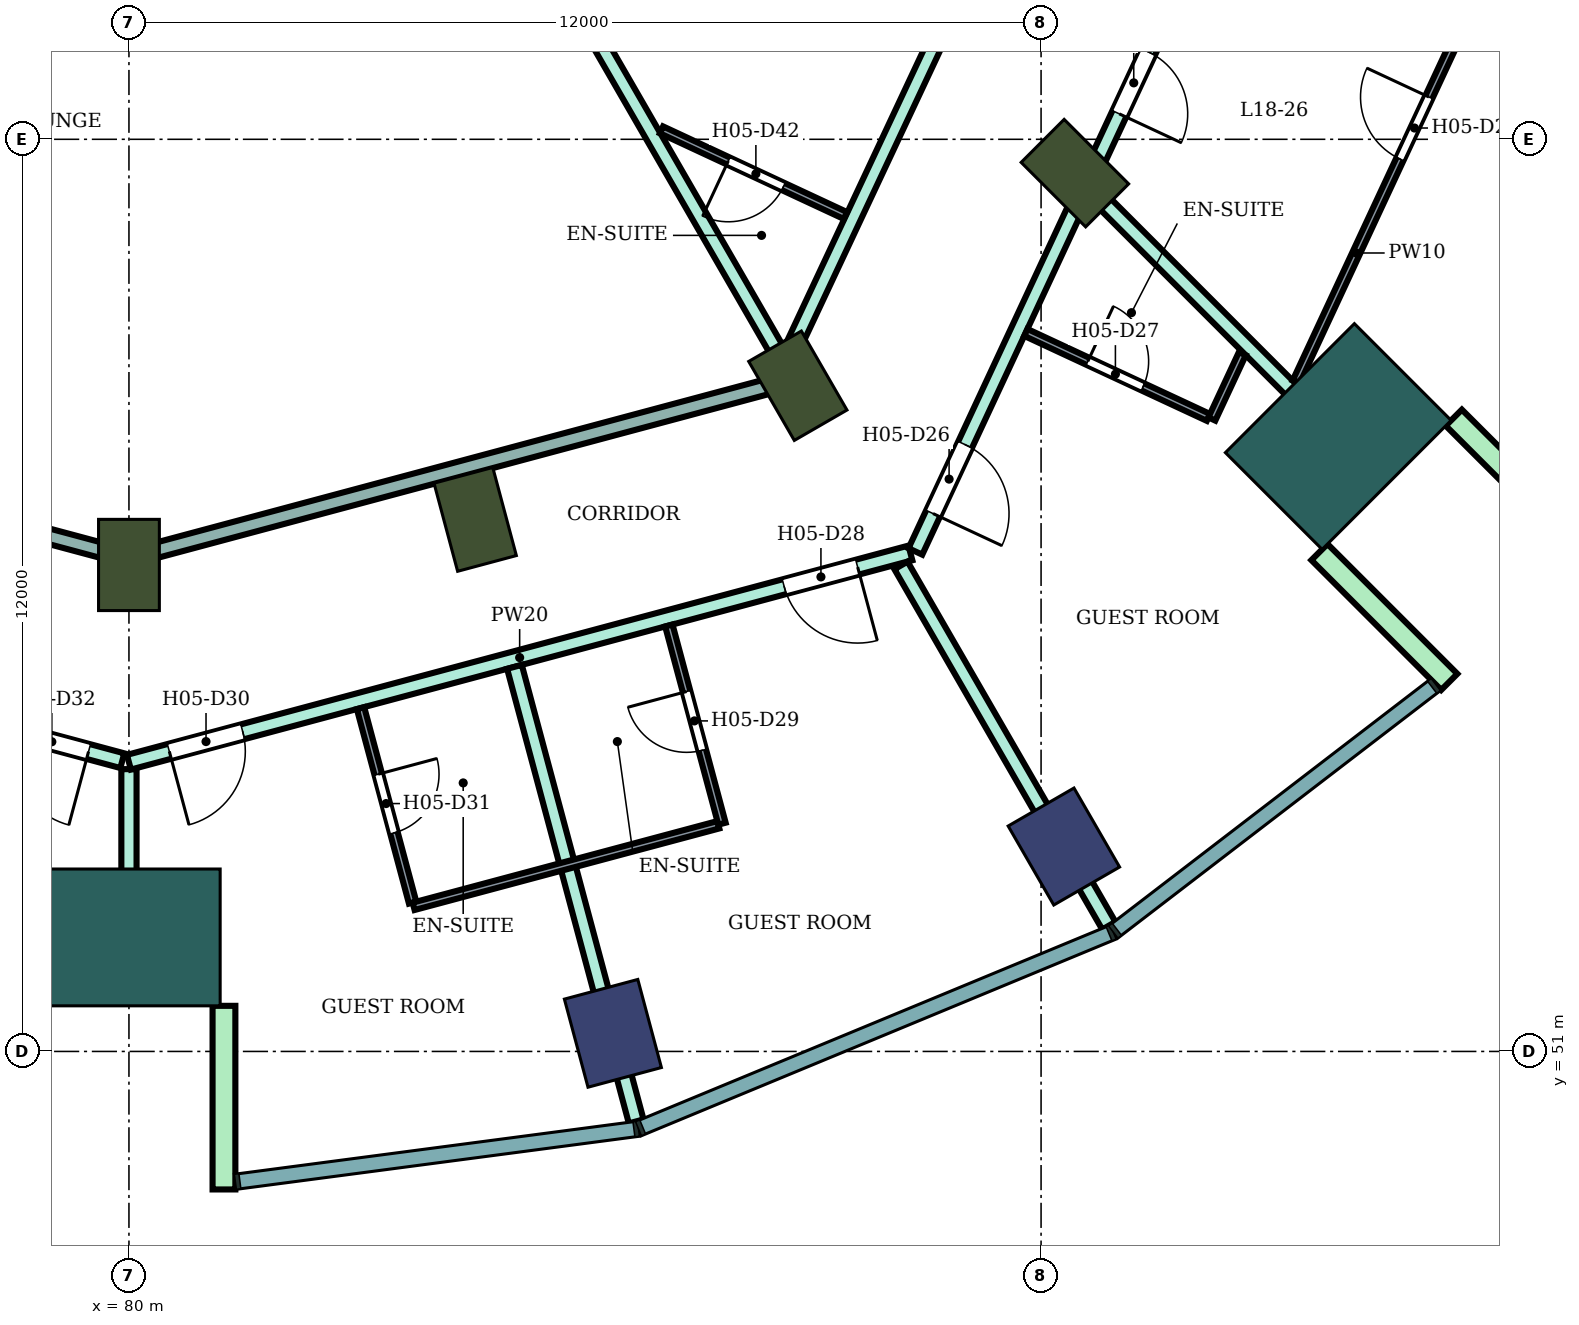
"""IFC4 building model, lengths in metres.
Left out: names, types, materials, properties, quantities, classifications, styles, units other than length and angle.
Written with IfcOpenShell. Run it as: python <this file> out.ifc"""

import sys

from ifc_helpers import new_model, si_unit, direction, frame, frame_2d, origin, origin_2d, place, context, subcontext, project, spatial, rectangle, extrude, element, fill, save


model = new_model("IFC4")
c1 = context("Model", 3, precision=1e-05, world=origin(), true_north=direction((0.0, 1.0)))
c2 = subcontext(c1, "Body", "Model", "MODEL_VIEW")
j1 = project(units=[si_unit("LENGTHUNIT", "METRE"), si_unit("PLANEANGLEUNIT", "RADIAN")], contexts=[c1])
p1 = place(None, origin())
s1 = spatial("IfcSite", under=j1, at=p1, CompositionType="ELEMENT")
p2 = place(p1, origin())
s2 = spatial("IfcBuilding", under=s1, at=p2, CompositionType="ELEMENT")
p3 = place(p2, frame((0.0, 0.0, 82.4)))
s3 = spatial("IfcBuildingStorey", under=s2, at=p3, CompositionType="ELEMENT", Elevation=82.4)
for number, where, z_axis, x_axis in (
    (1, (86.367, 51.238, 0.0), (0.0, 0.0, 1.0), (0.259, -0.966, 0.0)),
    (2, (92.3, 53.696, 0.0), (0.0, 0.0, 1.0), (0.5, -0.866, 0.0)),
):
    element("IfcColumn", number, at=place(p3, frame(where, z_axis=z_axis, x_axis=x_axis)), inside=s3, PredefinedType="COLUMN", context=c2, shape_type="SweptSolid", body=[
        extrude(rectangle(XDim=1.2, YDim=1.0, at=origin_2d()), origin(), (0.0, 0.0, 1.0), 3.8),
    ])
for number, where, z_axis, x_axis in (
    (3, (80.0, 57.4, 0.0), (0.0, 0.0, 1.0), (0.0, -1.0, 0.0)),
    (4, (84.555, 58.0, 0.0), (0.0, 0.0, 1.0), (0.259, -0.966, 0.0)),
    (5, (88.8, 59.758, 0.0), (0.0, 0.0, 1.0), (0.5, -0.866, 0.0)),
    (6, (92.445, 62.555, 0.0), (0.0, 0.0, 1.0), (0.707, -0.707, 0.0)),
):
    element("IfcColumn", number, at=place(p3, frame(where, z_axis=z_axis, x_axis=x_axis)), inside=s3, PredefinedType="COLUMN", context=c2, shape_type="SweptSolid", body=[
        extrude(rectangle(XDim=1.2, YDim=0.8, at=origin_2d()), origin(), (0.0, 0.0, 1.0), 3.8),
    ])
for number, where, z_axis, x_axis in (
    (7, (80.0, 52.5, 0.0), (0.0, 0.0, 1.0), (0.0, -1.0, 0.0)),
    (8, (95.91, 59.09, 0.0), (0.0, 0.0, 1.0), (0.707, -0.707, 0.0)),
):
    element("IfcColumn", number, at=place(p3, frame(where, z_axis=z_axis, x_axis=x_axis)), inside=s3, PredefinedType="COLUMN", context=c2, shape_type="SweptSolid", body=[
        extrude(rectangle(XDim=1.8, YDim=2.4, at=origin_2d()), origin(), (0.0, 0.0, 1.0), 3.8),
    ])
for number, where, z_axis, x_axis in (
    (9, (81.25, 51.6, 0.0), (0.0, 0.0, 1.0), (0.0, -1.0, 0.0)),
    (10, (95.662, 57.57, 0.0), (0.0, 0.0, 1.0), (0.707, -0.707, 0.0)),
    (11, (97.43, 59.338, 0.0), (0.0, 0.0, 1.0), (0.707, -0.707, 0.0)),
):
    element("IfcWall", number, at=place(p3, frame(where, z_axis=z_axis, x_axis=x_axis)), inside=s3, PredefinedType="NOTDEFINED", context=c2, shape_type="SweptSolid", body=[
        extrude(rectangle(XDim=2.416, YDim=0.3, at=frame_2d((1.208, 0.0))), origin(), (0.0, 0.0, 1.0), 3.8),
    ])
p4 = place(p3, frame((69.652, 57.578, 0.0), z_axis=(0.0, 0.0, 1.0), x_axis=(0.965857425723, -0.259074184695, 0.0)))
e12 = element("IfcWall", 12, at=p4, inside=s3, PredefinedType="PARTITIONING", context=c2, shape_type="SweptSolid", body=[
    extrude(rectangle(XDim=10.623, YDim=0.2, at=frame_2d((5.312, 0.0))), origin(), (0.0, 0.0, 1.0), 3.35),
])
p5 = place(p4, frame((9.163, 0.0, 0.0)))
e13 = element("IfcOpeningElement", 13, at=p5, cuts=e12, PredefinedType="OPENING", context=c2, shape_type="SweptSolid", body=[
    extrude(rectangle(XDim=1.0, YDim=2.1, at=frame_2d((0.5, 1.05))), frame((0.0, 0.11, 0.0), z_axis=(0.0, -1.0, 0.0), x_axis=(1.0, 0.0, 0.0)), (0.0, 0.0, 1.0), 0.22),
])
p6 = place(p4, frame((0.788, 0.0, 0.0)))
e14 = element("IfcOpeningElement", 14, at=p6, cuts=e12, PredefinedType="OPENING", context=c2, shape_type="SweptSolid", body=[
    extrude(rectangle(XDim=1.0, YDim=2.1, at=frame_2d((0.5, 1.05))), frame((0.0, 0.11, 0.0), z_axis=(0.0, -1.0, 0.0), x_axis=(1.0, 0.0, 0.0)), (0.0, 0.0, 1.0), 0.22),
])
p7 = place(p3, frame((71.498, 59.774, 0.0), z_axis=(0.0, 0.0, 1.0), x_axis=(0.965911938046, -0.258870871168, 0.0)))
e15 = element("IfcWall", 15, at=p7, inside=s3, PredefinedType="PARTITIONING", context=c2, shape_type="SweptSolid", body=[
    extrude(rectangle(XDim=8.752, YDim=0.2, at=frame_2d((4.376, 0.0))), origin(), (0.0, 0.0, 1.0), 2.98),
])
p8 = place(p7, frame((4.701, 0.0, 0.0)))
e16 = element("IfcOpeningElement", 16, at=p8, cuts=e15, PredefinedType="OPENING", context=c2, shape_type="SweptSolid", body=[
    extrude(rectangle(XDim=1.8, YDim=2.1, at=frame_2d((0.9, 1.05))), frame((0.0, 0.11, 0.0), z_axis=(0.0, -1.0, 0.0), x_axis=(1.0, 0.0, 0.0)), (0.0, 0.0, 1.0), 0.22),
])
p9 = place(p3, frame((80.0, 51.8, 0.0), z_axis=(0.0, 0.0, 1.0), x_axis=(0.0, 1.0, 0.0)))
e17 = element("IfcWall", 17, at=p9, inside=s3, PredefinedType="PARTITIONING", context=c2, shape_type="SweptSolid", body=[
    extrude(rectangle(XDim=2.914, YDim=0.2, at=frame_2d((1.457, 0.0))), origin(), (0.0, 0.0, 1.0), 3.35),
])
p10 = place(p3, frame((80.0, 54.805, 0.0), z_axis=(0.0, 0.0, 1.0), x_axis=(0.965962177934, 0.258683340788, 0.0)))
e18 = element("IfcWall", 18, at=p10, inside=s3, PredefinedType="PARTITIONING", context=c2, shape_type="SweptSolid", body=[
    extrude(rectangle(XDim=10.643, YDim=0.2, at=frame_2d((5.322, 0.0))), origin(), (0.0, 0.0, 1.0), 3.35),
])
p11 = place(p10, frame((8.925, 0.0, 0.0)))
e19 = element("IfcOpeningElement", 19, at=p11, cuts=e18, PredefinedType="OPENING", context=c2, shape_type="SweptSolid", body=[
    extrude(rectangle(XDim=1.0, YDim=2.1, at=frame_2d((0.5, 1.05))), frame((0.0, 0.11, 0.0), z_axis=(0.0, -1.0, 0.0), x_axis=(1.0, 0.0, 0.0)), (0.0, 0.0, 1.0), 0.22),
])
p12 = place(p10, frame((0.55, 0.0, 0.0)))
e20 = element("IfcOpeningElement", 20, at=p12, cuts=e18, PredefinedType="OPENING", context=c2, shape_type="SweptSolid", body=[
    extrude(rectangle(XDim=1.0, YDim=2.1, at=frame_2d((0.5, 1.05))), frame((0.0, 0.11, 0.0), z_axis=(0.0, -1.0, 0.0), x_axis=(1.0, 0.0, 0.0)), (0.0, 0.0, 1.0), 0.22),
])
p13 = place(p3, frame((80.0, 57.496, 0.0), z_axis=(0.0, 0.0, 1.0), x_axis=(0.96592471314, 0.258823199396, 0.0)))
e21 = element("IfcWall", 21, at=p13, inside=s3, PredefinedType="PARTITIONING", context=c2, shape_type="SweptSolid", body=[
    extrude(rectangle(XDim=8.732, YDim=0.2, at=frame_2d((4.366, 0.0))), origin(), (0.0, 0.0, 1.0), 2.98),
])
p14 = place(p3, frame((83.846, 68.33, 0.0), z_axis=(0.0, 0.0, 1.0), x_axis=(0.499822319857, -0.866127963163, 0.0)))
e22 = element("IfcWall", 22, at=p14, inside=s3, PredefinedType="PARTITIONING", context=c2, shape_type="SweptSolid", body=[
    extrude(rectangle(XDim=9.382, YDim=0.2, at=frame_2d((4.691, 0.0))), origin(), (0.0, 0.0, 1.0), 3.35),
])
p15 = place(p3, frame((85.072, 56.06, 0.0), z_axis=(0.0, 0.0, 1.0), x_axis=(0.258703231129, -0.965956851109, 0.0)))
e23 = element("IfcWall", 23, at=p15, inside=s3, PredefinedType="PARTITIONING", context=c2, shape_type="SweptSolid", body=[
    extrude(rectangle(XDim=6.191, YDim=0.2, at=frame_2d((3.095, 0.0))), origin(), (0.0, 0.0, 1.0), 3.35),
])
p16 = place(p3, frame((88.501, 59.775, 0.0), z_axis=(0.0, 0.0, 1.0), x_axis=(0.424700525505, 0.905333896215, 0.0)))
e24 = element("IfcWall", 24, at=p16, inside=s3, PredefinedType="PARTITIONING", context=c2, shape_type="SweptSolid", body=[
    extrude(rectangle(XDim=7.53, YDim=0.2, at=frame_2d((3.765, 0.0))), origin(), (0.0, 0.0, 1.0), 3.35),
])
p17 = place(p16, frame((5.83, 0.0, 0.0)))
e25 = element("IfcOpeningElement", 25, at=p17, cuts=e24, PredefinedType="OPENING", context=c2, shape_type="SweptSolid", body=[
    extrude(rectangle(XDim=1.0, YDim=2.1, at=frame_2d((0.5, 1.05))), frame((0.0, 0.11, 0.0), z_axis=(0.0, -1.0, 0.0), x_axis=(1.0, 0.0, 0.0)), (0.0, 0.0, 1.0), 0.22),
])
p18 = place(p3, frame((90.157, 57.394, 0.0), z_axis=(0.0, 0.0, 1.0), x_axis=(0.499815153866, -0.86613209845, 0.0)))
e26 = element("IfcWall", 26, at=p18, inside=s3, PredefinedType="PARTITIONING", context=c2, shape_type="SweptSolid", body=[
    extrude(rectangle(XDim=5.472, YDim=0.2, at=frame_2d((2.736, 0.0))), origin(), (0.0, 0.0, 1.0), 3.35),
])
p19 = place(p3, frame((90.346, 57.578, 0.0), z_axis=(0.0, 0.0, 1.0), x_axis=(0.422403412327, 0.906407941964, 0.0)))
e27 = element("IfcWall", 27, at=p19, inside=s3, PredefinedType="PARTITIONING", context=c2, shape_type="SweptSolid", body=[
    extrude(rectangle(XDim=8.208, YDim=0.2, at=frame_2d((4.104, 0.0))), origin(), (0.0, 0.0, 1.0), 3.35),
])
p20 = place(p19, frame((6.351, 0.0, 0.0)))
e28 = element("IfcOpeningElement", 28, at=p20, cuts=e27, PredefinedType="OPENING", context=c2, shape_type="SweptSolid", body=[
    extrude(rectangle(XDim=0.9, YDim=2.1, at=frame_2d((0.45, 1.05))), frame((0.0, 0.11, 0.0), z_axis=(0.0, -1.0, 0.0), x_axis=(1.0, 0.0, 0.0)), (0.0, 0.0, 1.0), 0.22),
])
p21 = place(p19, frame((0.55, 0.0, 0.0)))
e29 = element("IfcOpeningElement", 29, at=p21, cuts=e27, PredefinedType="OPENING", context=c2, shape_type="SweptSolid", body=[
    extrude(rectangle(XDim=1.0, YDim=2.1, at=frame_2d((0.5, 1.05))), frame((0.0, 0.11, 0.0), z_axis=(0.0, -1.0, 0.0), x_axis=(1.0, 0.0, 0.0)), (0.0, 0.0, 1.0), 0.22),
])
p22 = place(p3, frame((92.692, 62.303, 0.0), z_axis=(0.0, 0.0, 1.0), x_axis=(0.706920663731, -0.707292849667, 0.0)))
e30 = element("IfcWall", 30, at=p22, inside=s3, PredefinedType="PARTITIONING", context=c2, shape_type="SweptSolid", body=[
    extrude(rectangle(XDim=5.248, YDim=0.2, at=frame_2d((2.624, 0.0))), origin(), (0.0, 0.0, 1.0), 3.35),
])
p23 = place(p3, frame((83.047, 55.516, 0.0), z_axis=(0.0, 0.0, 1.0), x_axis=(0.258677737588, -0.965963678446, 0.0)))
e31 = element("IfcWall", 31, at=p23, inside=s3, PredefinedType="PARTITIONING", context=c2, shape_type="SweptSolid", body=[
    extrude(rectangle(XDim=2.649, YDim=0.1, at=frame_2d((1.325, 0.0))), origin(), (0.0, 0.0, 1.0), 3.35),
])
p24 = place(p23, frame((0.9, 0.0, 0.0)))
e32 = element("IfcOpeningElement", 32, at=p24, cuts=e31, PredefinedType="OPENING", context=c2, shape_type="SweptSolid", body=[
    extrude(rectangle(XDim=0.8, YDim=2.1, at=frame_2d((0.4, 1.05))), frame((0.0, 0.06, 0.0), z_axis=(0.0, -1.0, 0.0), x_axis=(1.0, 0.0, 0.0)), (0.0, 0.0, 1.0), 0.12),
])
p25 = place(p3, frame((83.745, 52.909, 0.0), z_axis=(0.0, 0.0, 1.0), x_axis=(0.965995295758, 0.258559642196, 0.0)))
e33 = element("IfcWall", 33, at=p25, inside=s3, PredefinedType="PARTITIONING", context=c2, shape_type="SweptSolid", body=[
    extrude(rectangle(XDim=4.15, YDim=0.1, at=frame_2d((2.075, 0.0))), origin(), (0.0, 0.0, 1.0), 3.35),
])
p26 = place(p3, frame((87.006, 63.124, 0.0), z_axis=(0.0, 0.0, 1.0), x_axis=(0.906535604863, -0.422129360642, 0.0)))
e34 = element("IfcWall", 34, at=p26, inside=s3, PredefinedType="PARTITIONING", context=c2, shape_type="SweptSolid", body=[
    extrude(rectangle(XDim=2.67, YDim=0.1, at=frame_2d((1.335, 0.0))), origin(), (0.0, 0.0, 1.0), 3.35),
])
p27 = place(p26, frame((0.97, 0.0, 0.0)))
e35 = element("IfcOpeningElement", 35, at=p27, cuts=e34, PredefinedType="OPENING", context=c2, shape_type="SweptSolid", body=[
    extrude(rectangle(XDim=0.8, YDim=2.1, at=frame_2d((0.4, 1.05))), frame((0.0, 0.06, 0.0), z_axis=(0.0, -1.0, 0.0), x_axis=(1.0, 0.0, 0.0)), (0.0, 0.0, 1.0), 0.12),
])
p28 = place(p3, frame((87.103, 56.604, 0.0), z_axis=(0.0, 0.0, 1.0), x_axis=(0.258883730688, -0.965908491517, 0.0)))
e36 = element("IfcWall", 36, at=p28, inside=s3, PredefinedType="PARTITIONING", context=c2, shape_type="SweptSolid", body=[
    extrude(rectangle(XDim=2.7, YDim=0.1, at=frame_2d((1.35, 0.0))), origin(), (0.0, 0.0, 1.0), 3.35),
])
p29 = place(p28, frame((0.9, 0.0, 0.0)))
e37 = element("IfcOpeningElement", 37, at=p29, cuts=e36, PredefinedType="OPENING", context=c2, shape_type="SweptSolid", body=[
    extrude(rectangle(XDim=0.8, YDim=2.1, at=frame_2d((0.4, 1.05))), frame((0.0, 0.06, 0.0), z_axis=(0.0, -1.0, 0.0), x_axis=(1.0, 0.0, 0.0)), (0.0, 0.0, 1.0), 0.12),
])
p30 = place(p3, frame((91.8, 60.459, 0.0), z_axis=(0.0, 0.0, 1.0), x_axis=(0.906644059932, -0.421896371861, 0.0)))
e38 = element("IfcWall", 38, at=p30, inside=s3, PredefinedType="PARTITIONING", context=c2, shape_type="SweptSolid", body=[
    extrude(rectangle(XDim=2.649, YDim=0.1, at=frame_2d((1.325, 0.0))), origin(), (0.0, 0.0, 1.0), 3.35),
])
p31 = place(p30, frame((0.899, 0.0, 0.0)))
e39 = element("IfcOpeningElement", 39, at=p31, cuts=e38, PredefinedType="OPENING", context=c2, shape_type="SweptSolid", body=[
    extrude(rectangle(XDim=0.8, YDim=2.1, at=frame_2d((0.4, 1.05))), frame((0.0, 0.06, 0.0), z_axis=(0.0, -1.0, 0.0), x_axis=(1.0, 0.0, 0.0)), (0.0, 0.0, 1.0), 0.12),
])
p32 = place(p3, frame((94.247, 59.32, 0.0), z_axis=(0.0, 0.0, 1.0), x_axis=(0.422660124657, 0.906288264861, 0.0)))
e40 = element("IfcWall", 40, at=p32, inside=s3, PredefinedType="PARTITIONING", context=c2, shape_type="SweptSolid", body=[
    extrude(rectangle(XDim=0.949, YDim=0.1, at=frame_2d((0.475, 0.0))), origin(), (0.0, 0.0, 1.0), 3.35),
])
p33 = place(p3, frame((95.355, 59.806, 0.0), z_axis=(0.0, 0.0, 1.0), x_axis=(0.422407546544, 0.906406015328, 0.0)))
e41 = element("IfcWall", 41, at=p33, inside=s3, PredefinedType="PARTITIONING", context=c2, shape_type="SweptSolid", body=[
    extrude(rectangle(XDim=7.496, YDim=0.1, at=frame_2d((3.748, 0.0))), origin(), (0.0, 0.0, 1.0), 3.35),
])
p34 = place(p33, frame((3.238, 0.0, 0.0)))
e42 = element("IfcOpeningElement", 42, at=p34, cuts=e41, PredefinedType="OPENING", context=c2, shape_type="SweptSolid", body=[
    extrude(rectangle(XDim=0.9, YDim=2.1, at=frame_2d((0.45, 1.05))), frame((0.0, 0.06, 0.0), z_axis=(0.0, -1.0, 0.0), x_axis=(1.0, 0.0, 0.0)), (0.0, 0.0, 1.0), 0.12),
])
p35 = place(p20, frame((0.9, 0.0, 0.0), z_axis=(0.0, 0.0, 1.0), x_axis=(-1.0, 0.0, 0.0)))
e43 = element("IfcDoor", 43, at=p35, inside=s3, OperationType="SINGLE_SWING_RIGHT", PredefinedType="DOOR", context=c2, shape_type="SweptSolid", body=[
    extrude(rectangle(XDim=0.9, YDim=2.1, at=frame_2d((0.45, 1.05))), frame((0.0, 0.025, 0.0), z_axis=(0.0, -1.0, 0.0), x_axis=(1.0, 0.0, 0.0)), (0.0, 0.0, 1.0), 0.05),
])
fill(e28, e43)
p36 = place(p34, origin())
e44 = element("IfcDoor", 44, at=p36, inside=s3, OperationType="SINGLE_SWING_RIGHT", PredefinedType="DOOR", context=c2, shape_type="SweptSolid", body=[
    extrude(rectangle(XDim=0.9, YDim=2.1, at=frame_2d((0.45, 1.05))), frame((0.0, 0.025, 0.0), z_axis=(0.0, -1.0, 0.0), x_axis=(1.0, 0.0, 0.0)), (0.0, 0.0, 1.0), 0.05),
])
fill(e42, e44)
p37 = place(p21, frame((1.0, 0.0, 0.0), z_axis=(0.0, 0.0, 1.0), x_axis=(-1.0, 0.0, 0.0)))
e45 = element("IfcDoor", 45, at=p37, inside=s3, OperationType="SINGLE_SWING_RIGHT", PredefinedType="DOOR", context=c2, shape_type="SweptSolid", body=[
    extrude(rectangle(XDim=1.0, YDim=2.1, at=frame_2d((0.5, 1.05))), frame((0.0, 0.025, 0.0), z_axis=(0.0, -1.0, 0.0), x_axis=(1.0, 0.0, 0.0)), (0.0, 0.0, 1.0), 0.05),
])
fill(e29, e45)
p38 = place(p31, origin())
e46 = element("IfcDoor", 46, at=p38, inside=s3, OperationType="SINGLE_SWING_LEFT", PredefinedType="DOOR", context=c2, shape_type="SweptSolid", body=[
    extrude(rectangle(XDim=0.8, YDim=2.1, at=frame_2d((0.4, 1.05))), frame((0.0, 0.025, 0.0), z_axis=(0.0, -1.0, 0.0), x_axis=(1.0, 0.0, 0.0)), (0.0, 0.0, 1.0), 0.05),
])
fill(e39, e46)
p39 = place(p11, frame((1.0, 0.0, 0.0), z_axis=(0.0, 0.0, 1.0), x_axis=(-1.0, 0.0, 0.0)))
e47 = element("IfcDoor", 47, at=p39, inside=s3, OperationType="SINGLE_SWING_LEFT", PredefinedType="DOOR", context=c2, shape_type="SweptSolid", body=[
    extrude(rectangle(XDim=1.0, YDim=2.1, at=frame_2d((0.5, 1.05))), frame((0.0, 0.025, 0.0), z_axis=(0.0, -1.0, 0.0), x_axis=(1.0, 0.0, 0.0)), (0.0, 0.0, 1.0), 0.05),
])
fill(e19, e47)
p40 = place(p29, frame((0.8, 0.0, 0.0), z_axis=(0.0, 0.0, 1.0), x_axis=(-1.0, 0.0, 0.0)))
e48 = element("IfcDoor", 48, at=p40, inside=s3, OperationType="SINGLE_SWING_RIGHT", PredefinedType="DOOR", context=c2, shape_type="SweptSolid", body=[
    extrude(rectangle(XDim=0.8, YDim=2.1, at=frame_2d((0.4, 1.05))), frame((0.0, 0.025, 0.0), z_axis=(0.0, -1.0, 0.0), x_axis=(1.0, 0.0, 0.0)), (0.0, 0.0, 1.0), 0.05),
])
fill(e37, e48)
p41 = place(p12, frame((1.0, 0.0, 0.0), z_axis=(0.0, 0.0, 1.0), x_axis=(-1.0, 0.0, 0.0)))
e49 = element("IfcDoor", 49, at=p41, inside=s3, OperationType="SINGLE_SWING_RIGHT", PredefinedType="DOOR", context=c2, shape_type="SweptSolid", body=[
    extrude(rectangle(XDim=1.0, YDim=2.1, at=frame_2d((0.5, 1.05))), frame((0.0, 0.025, 0.0), z_axis=(0.0, -1.0, 0.0), x_axis=(1.0, 0.0, 0.0)), (0.0, 0.0, 1.0), 0.05),
])
fill(e20, e49)
p42 = place(p24, origin())
e50 = element("IfcDoor", 50, at=p42, inside=s3, OperationType="SINGLE_SWING_LEFT", PredefinedType="DOOR", context=c2, shape_type="SweptSolid", body=[
    extrude(rectangle(XDim=0.8, YDim=2.1, at=frame_2d((0.4, 1.05))), frame((0.0, 0.025, 0.0), z_axis=(0.0, -1.0, 0.0), x_axis=(1.0, 0.0, 0.0)), (0.0, 0.0, 1.0), 0.05),
])
fill(e32, e50)
p43 = place(p5, frame((1.0, 0.0, 0.0), z_axis=(0.0, 0.0, 1.0), x_axis=(-1.0, 0.0, 0.0)))
e51 = element("IfcDoor", 51, at=p43, inside=s3, OperationType="SINGLE_SWING_LEFT", PredefinedType="DOOR", context=c2, shape_type="SweptSolid", body=[
    extrude(rectangle(XDim=1.0, YDim=2.1, at=frame_2d((0.5, 1.05))), frame((0.0, 0.025, 0.0), z_axis=(0.0, -1.0, 0.0), x_axis=(1.0, 0.0, 0.0)), (0.0, 0.0, 1.0), 0.05),
])
fill(e13, e51)
p44 = place(p27, frame((0.8, 0.0, 0.0), z_axis=(0.0, 0.0, 1.0), x_axis=(-1.0, 0.0, 0.0)))
e52 = element("IfcDoor", 52, at=p44, inside=s3, OperationType="SINGLE_SWING_RIGHT", PredefinedType="DOOR", context=c2, shape_type="SweptSolid", body=[
    extrude(rectangle(XDim=0.8, YDim=2.1, at=frame_2d((0.4, 1.05))), frame((0.0, 0.025, 0.0), z_axis=(0.0, -1.0, 0.0), x_axis=(1.0, 0.0, 0.0)), (0.0, 0.0, 1.0), 0.05),
])
fill(e35, e52)
save(model, sys.argv[1])
